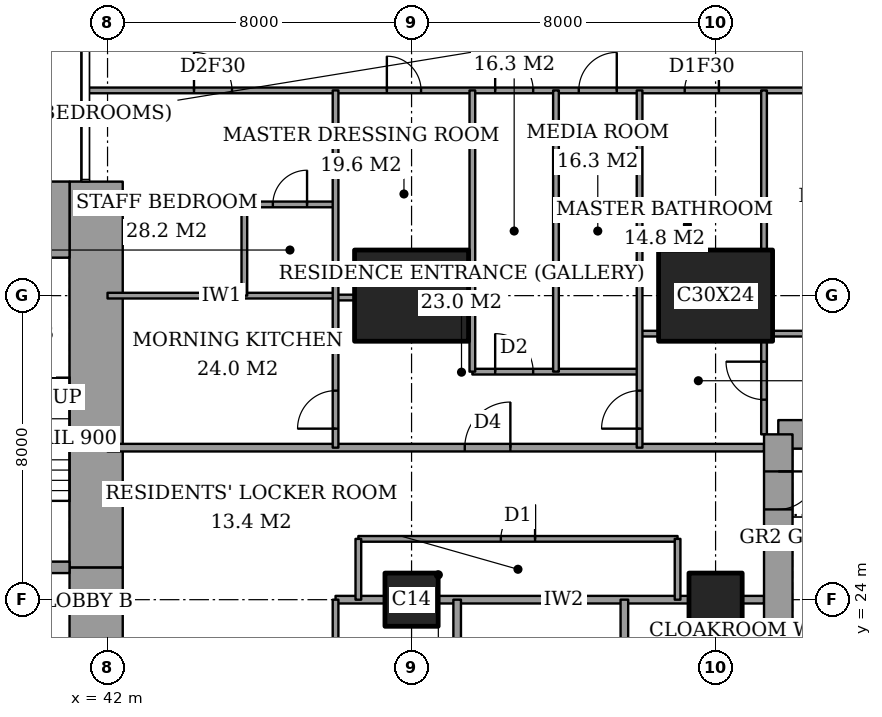
"""IFC4 building model, lengths in metres.
Left out: names, types, materials, properties, quantities, classifications, styles, units other than length and angle.
Written with IfcOpenShell. Run it as: python <this file> out.ifc"""

import sys

from ifc_helpers import new_model, si_unit, direction, frame, frame_2d, origin, origin_2d, place, context, subcontext, project, spatial, rectangle, extrude, element, fill, save


model = new_model("IFC4")
c1 = context("Model", 3, precision=1e-05, world=origin(), true_north=direction((0.0, 1.0)))
c2 = subcontext(c1, "Body", "Model", "MODEL_VIEW")
j1 = project(units=[si_unit("LENGTHUNIT", "METRE"), si_unit("PLANEANGLEUNIT", "RADIAN")], contexts=[c1])
p1 = place(None, origin())
s1 = spatial("IfcSite", under=j1, at=p1, CompositionType="ELEMENT")
p2 = place(p1, origin())
s2 = spatial("IfcBuilding", under=s1, at=p2, CompositionType="ELEMENT")
p3 = place(p2, frame((0.0, 0.0, 287.1)))
s3 = spatial("IfcBuildingStorey", under=s2, at=p3, CompositionType="ELEMENT", Elevation=287.1)
p4 = place(p3, frame((50.0, 24.0, 0.0), z_axis=(0.0, 0.0, 1.0), x_axis=(1.0, 0.0, 0.0)))
e1 = element("IfcColumn", 1, at=p4, inside=s3, PredefinedType="COLUMN", context=c2, shape_type="SweptSolid", body=[
    extrude(rectangle(XDim=1.4, YDim=1.4, at=origin_2d()), origin(), (0.0, 0.0, 1.0), 4.5),
])
p5 = place(p3, frame((50.0, 32.0, 0.0), z_axis=(0.0, 0.0, 1.0), x_axis=(1.0, 0.0, 0.0)))
e2 = element("IfcColumn", 2, at=p5, inside=s3, PredefinedType="COLUMN", context=c2, shape_type="SweptSolid", body=[
    extrude(rectangle(XDim=3.0, YDim=2.4, at=origin_2d()), origin(), (0.0, 0.0, 1.0), 4.5),
])
p6 = place(p3, frame((58.0, 24.0, 0.0), z_axis=(0.0, 0.0, 1.0), x_axis=(1.0, 0.0, 0.0)))
e3 = element("IfcColumn", 3, at=p6, inside=s3, PredefinedType="COLUMN", context=c2, shape_type="SweptSolid", body=[
    extrude(rectangle(XDim=1.4, YDim=1.4, at=origin_2d()), origin(), (0.0, 0.0, 1.0), 4.5),
])
p7 = place(p3, frame((58.0, 32.0, 0.0), z_axis=(0.0, 0.0, 1.0), x_axis=(1.0, 0.0, 0.0)))
e4 = element("IfcColumn", 4, at=p7, inside=s3, PredefinedType="COLUMN", context=c2, shape_type="SweptSolid", body=[
    extrude(rectangle(XDim=3.0, YDim=2.4, at=origin_2d()), origin(), (0.0, 0.0, 1.0), 4.5),
])
p8 = place(p3, frame((37.85, 34.0, 0.0), z_axis=(0.0, 0.0, 1.0), x_axis=(1.0, 0.0, 0.0)))
e5 = element("IfcWall", 5, at=p8, inside=s3, PredefinedType="SHEAR", context=c2, shape_type="SweptSolid", body=[
    extrude(rectangle(XDim=3.15, YDim=2.0, at=frame_2d((1.575, 0.0))), origin(), (0.0, 0.0, 1.0), 4.5),
])
p9 = place(p3, frame((41.7, 13.0, 0.0), z_axis=(0.0, 0.0, 1.0), x_axis=(0.0, 1.0, 0.0)))
e6 = element("IfcWall", 6, at=p9, inside=s3, PredefinedType="SHEAR", context=c2, shape_type="SweptSolid", body=[
    extrude(rectangle(XDim=11.85, YDim=1.4, at=frame_2d((5.925, 0.0))), origin(), (0.0, 0.0, 1.0), 4.5),
])
p10 = place(p9, frame((7.5, 0.0, 0.0)))
e7 = element("IfcOpeningElement", 7, at=p10, cuts=e6, PredefinedType="OPENING", context=c2, shape_type="SweptSolid", body=[
    extrude(rectangle(XDim=1.8, YDim=2.4, at=frame_2d((0.9, 1.2))), frame((0.0, 0.71, 0.0), z_axis=(0.0, -1.0, 0.0), x_axis=(1.0, 0.0, 0.0)), (0.0, 0.0, 1.0), 1.42),
])
p11 = place(p3, frame((41.7, 24.85, 0.0), z_axis=(0.0, 0.0, 1.0), x_axis=(0.0, 1.0, 0.0)))
e8 = element("IfcWall", 8, at=p11, inside=s3, PredefinedType="SHEAR", context=c2, shape_type="SweptSolid", body=[
    extrude(rectangle(XDim=10.15, YDim=1.4, at=frame_2d((5.075, 0.0))), origin(), (0.0, 0.0, 1.0), 4.5),
])
p12 = place(p3, frame((37.85, 24.85, 0.0), z_axis=(0.0, 0.0, 1.0), x_axis=(1.0, 0.0, 0.0)))
e9 = element("IfcWall", 9, at=p12, inside=s3, PredefinedType="SHEAR", context=c2, shape_type="SweptSolid", body=[
    extrude(rectangle(XDim=3.15, YDim=0.3, at=frame_2d((1.575, 0.0))), origin(), (0.0, 0.0, 1.0), 4.5),
])
p13 = place(p12, frame((0.95, 0.0, 0.0)))
e10 = element("IfcOpeningElement", 10, at=p13, cuts=e9, PredefinedType="OPENING", context=c2, shape_type="SweptSolid", body=[
    extrude(rectangle(XDim=1.0, YDim=2.1, at=frame_2d((0.5, 1.05))), frame((0.0, 0.16, 0.0), z_axis=(0.0, -1.0, 0.0), x_axis=(1.0, 0.0, 0.0)), (0.0, 0.0, 1.0), 0.32),
])
p14 = place(p3, frame((64.1, 28.35, 0.0), z_axis=(0.0, 0.0, 1.0), x_axis=(-1.0, 0.0, 0.0)))
e11 = element("IfcWall", 11, at=p14, inside=s3, PredefinedType="SHEAR", context=c2, shape_type="SweptSolid", body=[
    extrude(rectangle(XDim=4.45, YDim=0.75, at=frame_2d((2.225, 0.0))), origin(), (0.0, 0.0, 1.0), 4.5),
])
p15 = place(p3, frame((59.65, 28.35, 0.0), z_axis=(0.0, 0.0, 1.0), x_axis=(0.0, -1.0, 0.0)))
e12 = element("IfcWall", 12, at=p15, inside=s3, PredefinedType="SHEAR", context=c2, shape_type="SweptSolid", body=[
    extrude(rectangle(XDim=8.7, YDim=0.75, at=frame_2d((4.35, 0.0))), origin(), (0.0, 0.0, 1.0), 4.5),
])
p16 = place(p15, frame((0.975, 0.0, 0.0)))
e13 = element("IfcOpeningElement", 13, at=p16, cuts=e12, PredefinedType="OPENING", context=c2, shape_type="SweptSolid", body=[
    extrude(rectangle(XDim=1.0, YDim=2.1, at=frame_2d((0.5, 1.05))), frame((0.0, 0.385, 0.0), z_axis=(0.0, -1.0, 0.0), x_axis=(1.0, 0.0, 0.0)), (0.0, 0.0, 1.0), 0.77),
])
p17 = place(p3, frame((48.0, 24.0, 0.0), z_axis=(0.0, 0.0, 1.0), x_axis=(1.0, 0.0, 0.0)))
e14 = element("IfcWall", 14, at=p17, inside=s3, PredefinedType="PARTITIONING", context=c2, shape_type="SweptSolid", body=[
    extrude(rectangle(XDim=1.3, YDim=0.2, at=frame_2d((0.65, 0.0))), origin(), (0.0, 0.0, 1.0), 4.2),
])
p18 = place(p3, frame((50.7, 24.0, 0.0), z_axis=(0.0, 0.0, 1.0), x_axis=(1.0, 0.0, 0.0)))
e15 = element("IfcWall", 15, at=p18, inside=s3, PredefinedType="PARTITIONING", context=c2, shape_type="SweptSolid", body=[
    extrude(rectangle(XDim=6.6, YDim=0.2, at=frame_2d((3.3, 0.0))), origin(), (0.0, 0.0, 1.0), 4.2),
])
p19 = place(p3, frame((58.7, 24.0, 0.0), z_axis=(0.0, 0.0, 1.0), x_axis=(1.0, 0.0, 0.0)))
e16 = element("IfcWall", 16, at=p19, inside=s3, PredefinedType="PARTITIONING", context=c2, shape_type="SweptSolid", body=[
    extrude(rectangle(XDim=0.575, YDim=0.2, at=frame_2d((0.288, 0.0))), origin(), (0.0, 0.0, 1.0), 4.2),
])
p20 = place(p3, frame((48.6, 25.6, 0.0), z_axis=(0.0, 0.0, 1.0), x_axis=(1.0, 0.0, 0.0)))
e17 = element("IfcWall", 17, at=p20, inside=s3, PredefinedType="PARTITIONING", context=c2, shape_type="SweptSolid", body=[
    extrude(rectangle(XDim=8.4, YDim=0.15, at=frame_2d((4.2, 0.0))), origin(), (0.0, 0.0, 1.0), 4.2),
])
p21 = place(p20, frame((3.75, 0.0, 0.0)))
e18 = element("IfcOpeningElement", 18, at=p21, cuts=e17, PredefinedType="OPENING", context=c2, shape_type="SweptSolid", body=[
    extrude(rectangle(XDim=0.9, YDim=2.1, at=frame_2d((0.45, 1.05))), frame((0.0, 0.085, 0.0), z_axis=(0.0, -1.0, 0.0), x_axis=(1.0, 0.0, 0.0)), (0.0, 0.0, 1.0), 0.17),
])
p22 = place(p3, frame((42.0, 28.0, 0.0), z_axis=(0.0, 0.0, 1.0), x_axis=(1.0, 0.0, 0.0)))
e19 = element("IfcWall", 19, at=p22, inside=s3, PredefinedType="PARTITIONING", context=c2, shape_type="SweptSolid", body=[
    extrude(rectangle(XDim=17.275, YDim=0.2, at=frame_2d((8.637, 0.0))), origin(), (0.0, 0.0, 1.0), 4.2),
])
p23 = place(p22, frame((9.4, 0.0, 0.0)))
e20 = element("IfcOpeningElement", 20, at=p23, cuts=e19, PredefinedType="OPENING", context=c2, shape_type="SweptSolid", body=[
    extrude(rectangle(XDim=1.2, YDim=2.4, at=frame_2d((0.6, 1.2))), frame((0.0, 0.11, 0.0), z_axis=(0.0, -1.0, 0.0), x_axis=(1.0, 0.0, 0.0)), (0.0, 0.0, 1.0), 0.22),
])
p24 = place(p3, frame((51.6, 30.0, 0.0), z_axis=(0.0, 0.0, 1.0), x_axis=(1.0, 0.0, 0.0)))
e21 = element("IfcWall", 21, at=p24, inside=s3, PredefinedType="PARTITIONING", context=c2, shape_type="SweptSolid", body=[
    extrude(rectangle(XDim=4.4, YDim=0.15, at=frame_2d((2.2, 0.0))), origin(), (0.0, 0.0, 1.0), 4.2),
])
p25 = place(p24, frame((0.6, 0.0, 0.0)))
e22 = element("IfcOpeningElement", 22, at=p25, cuts=e21, PredefinedType="OPENING", context=c2, shape_type="SweptSolid", body=[
    extrude(rectangle(XDim=1.0, YDim=2.1, at=frame_2d((0.5, 1.05))), frame((0.0, 0.085, 0.0), z_axis=(0.0, -1.0, 0.0), x_axis=(1.0, 0.0, 0.0)), (0.0, 0.0, 1.0), 0.17),
])
p26 = place(p3, frame((56.0, 31.0, 0.0), z_axis=(0.0, 0.0, 1.0), x_axis=(1.0, 0.0, 0.0)))
e23 = element("IfcWall", 23, at=p26, inside=s3, PredefinedType="PARTITIONING", context=c2, shape_type="SweptSolid", body=[
    extrude(rectangle(XDim=0.5, YDim=0.15, at=frame_2d((0.25, 0.0))), origin(), (0.0, 0.0, 1.0), 4.2),
])
p27 = place(p3, frame((59.5, 31.0, 0.0), z_axis=(0.0, 0.0, 1.0), x_axis=(1.0, 0.0, 0.0)))
e24 = element("IfcWall", 24, at=p27, inside=s3, PredefinedType="PARTITIONING", context=c2, shape_type="SweptSolid", body=[
    extrude(rectangle(XDim=6.95, YDim=0.15, at=frame_2d((3.475, 0.0))), origin(), (0.0, 0.0, 1.0), 4.2),
])
p28 = place(p3, frame((48.0, 31.95, 0.0), z_axis=(0.0, 0.0, 1.0), x_axis=(1.0, 0.0, 0.0)))
e25 = element("IfcWall", 25, at=p28, inside=s3, PredefinedType="PARTITIONING", context=c2, shape_type="SweptSolid", body=[
    extrude(rectangle(XDim=0.5, YDim=0.15, at=frame_2d((0.25, 0.0))), origin(), (0.0, 0.0, 1.0), 4.2),
])
p29 = place(p3, frame((42.0, 32.0, 0.0), z_axis=(0.0, 0.0, 1.0), x_axis=(1.0, 0.0, 0.0)))
e26 = element("IfcWall", 26, at=p29, inside=s3, PredefinedType="PARTITIONING", context=c2, shape_type="SweptSolid", body=[
    extrude(rectangle(XDim=6.0, YDim=0.15, at=frame_2d((3.0, 0.0))), origin(), (0.0, 0.0, 1.0), 4.2),
])
p30 = place(p3, frame((45.6, 34.4, 0.0), z_axis=(0.0, 0.0, 1.0), x_axis=(1.0, 0.0, 0.0)))
e27 = element("IfcWall", 27, at=p30, inside=s3, PredefinedType="PARTITIONING", context=c2, shape_type="SweptSolid", body=[
    extrude(rectangle(XDim=2.4, YDim=0.15, at=frame_2d((1.2, 0.0))), origin(), (0.0, 0.0, 1.0), 4.2),
])
p31 = place(p30, frame((0.75, 0.0, 0.0)))
e28 = element("IfcOpeningElement", 28, at=p31, cuts=e27, PredefinedType="OPENING", context=c2, shape_type="SweptSolid", body=[
    extrude(rectangle(XDim=0.9, YDim=2.1, at=frame_2d((0.45, 1.05))), frame((0.0, 0.085, 0.0), z_axis=(0.0, -1.0, 0.0), x_axis=(1.0, 0.0, 0.0)), (0.0, 0.0, 1.0), 0.17),
])
p32 = place(p3, frame((41.439, 37.4, 0.0), z_axis=(0.0, 0.0, 1.0), x_axis=(1.0, 0.0, 0.0)))
e29 = element("IfcWall", 29, at=p32, inside=s3, PredefinedType="PARTITIONING", context=c2, shape_type="SweptSolid", body=[
    extrude(rectangle(XDim=25.011, YDim=0.15, at=frame_2d((12.505, 0.0))), origin(), (0.0, 0.0, 1.0), 4.2),
])
p33 = place(p32, frame((10.761, 0.0, 0.0)))
e30 = element("IfcOpeningElement", 30, at=p33, cuts=e29, PredefinedType="OPENING", context=c2, shape_type="SweptSolid", body=[
    extrude(rectangle(XDim=1.0, YDim=2.1, at=frame_2d((0.5, 1.05))), frame((0.0, 0.085, 0.0), z_axis=(0.0, -1.0, 0.0), x_axis=(1.0, 0.0, 0.0)), (0.0, 0.0, 1.0), 0.17),
])
p34 = place(p32, frame((20.924, 0.0, 0.0)))
e31 = element("IfcOpeningElement", 31, at=p34, cuts=e29, PredefinedType="OPENING", context=c2, shape_type="SweptSolid", body=[
    extrude(rectangle(XDim=1.0, YDim=2.1, at=frame_2d((0.5, 1.05))), frame((0.0, 0.085, 0.0), z_axis=(0.0, -1.0, 0.0), x_axis=(1.0, 0.0, 0.0)), (0.0, 0.0, 1.0), 0.17),
])
p35 = place(p32, frame((15.749, 0.0, 0.0)))
e32 = element("IfcOpeningElement", 32, at=p35, cuts=e29, PredefinedType="OPENING", context=c2, shape_type="SweptSolid", body=[
    extrude(rectangle(XDim=0.9, YDim=2.1, at=frame_2d((0.45, 1.05))), frame((0.0, 0.085, 0.0), z_axis=(0.0, -1.0, 0.0), x_axis=(1.0, 0.0, 0.0)), (0.0, 0.0, 1.0), 0.17),
])
p36 = place(p32, frame((12.961, 0.0, 0.0)))
e33 = element("IfcOpeningElement", 33, at=p36, cuts=e29, PredefinedType="OPENING", context=c2, shape_type="SweptSolid", body=[
    extrude(rectangle(XDim=1.0, YDim=2.1, at=frame_2d((0.5, 1.05))), frame((0.0, 0.085, 0.0), z_axis=(0.0, -1.0, 0.0), x_axis=(1.0, 0.0, 0.0)), (0.0, 0.0, 1.0), 0.17),
])
p37 = place(p32, frame((7.911, 0.0, 0.0)))
e34 = element("IfcOpeningElement", 34, at=p37, cuts=e29, PredefinedType="OPENING", context=c2, shape_type="SweptSolid", body=[
    extrude(rectangle(XDim=0.9, YDim=2.1, at=frame_2d((0.45, 1.05))), frame((0.0, 0.085, 0.0), z_axis=(0.0, -1.0, 0.0), x_axis=(1.0, 0.0, 0.0)), (0.0, 0.0, 1.0), 0.17),
])
p38 = place(p32, frame((2.836, 0.0, 0.0)))
e35 = element("IfcOpeningElement", 35, at=p38, cuts=e29, PredefinedType="OPENING", context=c2, shape_type="SweptSolid", body=[
    extrude(rectangle(XDim=1.0, YDim=2.1, at=frame_2d((0.5, 1.05))), frame((0.0, 0.085, 0.0), z_axis=(0.0, -1.0, 0.0), x_axis=(1.0, 0.0, 0.0)), (0.0, 0.0, 1.0), 0.17),
])
p39 = place(p3, frame((45.6, 32.0, 0.0), z_axis=(0.0, 0.0, 1.0), x_axis=(0.0, 1.0, 0.0)))
e36 = element("IfcWall", 36, at=p39, inside=s3, PredefinedType="PARTITIONING", context=c2, shape_type="SweptSolid", body=[
    extrude(rectangle(XDim=2.4, YDim=0.15, at=frame_2d((1.2, 0.0))), origin(), (0.0, 0.0, 1.0), 4.2),
])
p40 = place(p3, frame((48.0, 10.6, 0.0), z_axis=(0.0, 0.0, 1.0), x_axis=(0.0, 1.0, 0.0)))
e37 = element("IfcWall", 37, at=p40, inside=s3, PredefinedType="PARTITIONING", context=c2, shape_type="SweptSolid", body=[
    extrude(rectangle(XDim=13.4, YDim=0.15, at=frame_2d((6.7, 0.0))), origin(), (0.0, 0.0, 1.0), 4.2),
])
p41 = place(p40, frame((10.8, 0.0, 0.0)))
e38 = element("IfcOpeningElement", 38, at=p41, cuts=e37, PredefinedType="OPENING", context=c2, shape_type="SweptSolid", body=[
    extrude(rectangle(XDim=1.2, YDim=2.4, at=frame_2d((0.6, 1.2))), frame((0.0, 0.085, 0.0), z_axis=(0.0, -1.0, 0.0), x_axis=(1.0, 0.0, 0.0)), (0.0, 0.0, 1.0), 0.17),
])
p42 = place(p40, frame((7.45, 0.0, 0.0)))
e39 = element("IfcOpeningElement", 39, at=p42, cuts=e37, PredefinedType="OPENING", context=c2, shape_type="SweptSolid", body=[
    extrude(rectangle(XDim=0.9, YDim=2.1, at=frame_2d((0.45, 1.05))), frame((0.0, 0.085, 0.0), z_axis=(0.0, -1.0, 0.0), x_axis=(1.0, 0.0, 0.0)), (0.0, 0.0, 1.0), 0.17),
])
p43 = place(p3, frame((48.0, 28.0, 0.0), z_axis=(0.0, 0.0, 1.0), x_axis=(0.0, 1.0, 0.0)))
e40 = element("IfcWall", 40, at=p43, inside=s3, PredefinedType="PARTITIONING", context=c2, shape_type="SweptSolid", body=[
    extrude(rectangle(XDim=9.4, YDim=0.15, at=frame_2d((4.7, 0.0))), origin(), (0.0, 0.0, 1.0), 4.2),
])
p44 = place(p43, frame((0.5, 0.0, 0.0)))
e41 = element("IfcOpeningElement", 41, at=p44, cuts=e40, PredefinedType="OPENING", context=c2, shape_type="SweptSolid", body=[
    extrude(rectangle(XDim=1.0, YDim=2.1, at=frame_2d((0.5, 1.05))), frame((0.0, 0.085, 0.0), z_axis=(0.0, -1.0, 0.0), x_axis=(1.0, 0.0, 0.0)), (0.0, 0.0, 1.0), 0.17),
])
p45 = place(p3, frame((48.6, 24.0, 0.0), z_axis=(0.0, 0.0, 1.0), x_axis=(0.0, 1.0, 0.0)))
e42 = element("IfcWall", 42, at=p45, inside=s3, PredefinedType="PARTITIONING", context=c2, shape_type="SweptSolid", body=[
    extrude(rectangle(XDim=1.6, YDim=0.15, at=frame_2d((0.8, 0.0))), origin(), (0.0, 0.0, 1.0), 4.2),
])
p46 = place(p3, frame((51.2, 21.6, 0.0), z_axis=(0.0, 0.0, 1.0), x_axis=(0.0, 1.0, 0.0)))
e43 = element("IfcWall", 43, at=p46, inside=s3, PredefinedType="PARTITIONING", context=c2, shape_type="SweptSolid", body=[
    extrude(rectangle(XDim=2.4, YDim=0.2, at=frame_2d((1.2, 0.0))), origin(), (0.0, 0.0, 1.0), 4.2),
])
for number, where, z_axis, x_axis in (
    (44, (51.6, 30.0, 0.0), (0.0, 0.0, 1.0), (0.0, 1.0, 0.0)),
    (45, (53.8, 30.0, 0.0), (0.0, 0.0, 1.0), (0.0, 1.0, 0.0)),
):
    element("IfcWall", number, at=place(p3, frame(where, z_axis=z_axis, x_axis=x_axis)), inside=s3, PredefinedType="PARTITIONING", context=c2, shape_type="SweptSolid", body=[
        extrude(rectangle(XDim=7.4, YDim=0.15, at=frame_2d((3.7, 0.0))), origin(), (0.0, 0.0, 1.0), 4.2),
    ])
p47 = place(p3, frame((55.6, 21.6, 0.0), z_axis=(0.0, 0.0, 1.0), x_axis=(0.0, 1.0, 0.0)))
e46 = element("IfcWall", 46, at=p47, inside=s3, PredefinedType="PARTITIONING", context=c2, shape_type="SweptSolid", body=[
    extrude(rectangle(XDim=2.4, YDim=0.2, at=frame_2d((1.2, 0.0))), origin(), (0.0, 0.0, 1.0), 4.2),
])
p48 = place(p3, frame((56.0, 28.0, 0.0), z_axis=(0.0, 0.0, 1.0), x_axis=(0.0, 1.0, 0.0)))
e47 = element("IfcWall", 47, at=p48, inside=s3, PredefinedType="PARTITIONING", context=c2, shape_type="SweptSolid", body=[
    extrude(rectangle(XDim=9.4, YDim=0.15, at=frame_2d((4.7, 0.0))), origin(), (0.0, 0.0, 1.0), 4.2),
])
p49 = place(p48, frame((0.5, 0.0, 0.0)))
e48 = element("IfcOpeningElement", 48, at=p49, cuts=e47, PredefinedType="OPENING", context=c2, shape_type="SweptSolid", body=[
    extrude(rectangle(XDim=1.0, YDim=2.1, at=frame_2d((0.5, 1.05))), frame((0.0, 0.085, 0.0), z_axis=(0.0, -1.0, 0.0), x_axis=(1.0, 0.0, 0.0)), (0.0, 0.0, 1.0), 0.17),
])
p50 = place(p3, frame((57.0, 24.0, 0.0), z_axis=(0.0, 0.0, 1.0), x_axis=(0.0, 1.0, 0.0)))
e49 = element("IfcWall", 49, at=p50, inside=s3, PredefinedType="PARTITIONING", context=c2, shape_type="SweptSolid", body=[
    extrude(rectangle(XDim=1.6, YDim=0.15, at=frame_2d((0.8, 0.0))), origin(), (0.0, 0.0, 1.0), 4.2),
])
p51 = place(p3, frame((59.275, 28.35, 0.0), z_axis=(0.0, 0.0, 1.0), x_axis=(0.0, 1.0, 0.0)))
e50 = element("IfcWall", 50, at=p51, inside=s3, PredefinedType="PARTITIONING", context=c2, shape_type="SweptSolid", body=[
    extrude(rectangle(XDim=2.45, YDim=0.15, at=frame_2d((1.225, 0.0))), origin(), (0.0, 0.0, 1.0), 4.2),
])
p52 = place(p51, frame((0.913, 0.0, 0.0)))
e51 = element("IfcOpeningElement", 51, at=p52, cuts=e50, PredefinedType="OPENING", context=c2, shape_type="SweptSolid", body=[
    extrude(rectangle(XDim=1.0, YDim=2.1, at=frame_2d((0.5, 1.05))), frame((0.0, 0.085, 0.0), z_axis=(0.0, -1.0, 0.0), x_axis=(1.0, 0.0, 0.0)), (0.0, 0.0, 1.0), 0.17),
])
p53 = place(p3, frame((59.275, 33.2, 0.0), z_axis=(0.0, 0.0, 1.0), x_axis=(0.0, 1.0, 0.0)))
e52 = element("IfcWall", 52, at=p53, inside=s3, PredefinedType="PARTITIONING", context=c2, shape_type="SweptSolid", body=[
    extrude(rectangle(XDim=4.2, YDim=0.15, at=frame_2d((2.1, 0.0))), origin(), (0.0, 0.0, 1.0), 4.2),
])
p54 = place(p33, origin())
e53 = element("IfcDoor", 53, at=p54, inside=s3, OperationType="SINGLE_SWING_RIGHT", PredefinedType="DOOR", context=c2, shape_type="SweptSolid", body=[
    extrude(rectangle(XDim=1.0, YDim=2.1, at=frame_2d((0.5, 1.05))), frame((0.0, 0.025, 0.0), z_axis=(0.0, -1.0, 0.0), x_axis=(1.0, 0.0, 0.0)), (0.0, 0.0, 1.0), 0.05),
])
fill(e30, e53)
p55 = place(p52, origin())
e54 = element("IfcDoor", 54, at=p55, inside=s3, OperationType="SINGLE_SWING_LEFT", PredefinedType="DOOR", context=c2, shape_type="SweptSolid", body=[
    extrude(rectangle(XDim=1.0, YDim=2.1, at=frame_2d((0.5, 1.05))), frame((0.0, 0.025, 0.0), z_axis=(0.0, -1.0, 0.0), x_axis=(1.0, 0.0, 0.0)), (0.0, 0.0, 1.0), 0.05),
])
fill(e51, e54)
p56 = place(p35, origin())
e55 = element("IfcDoor", 55, at=p56, inside=s3, OperationType="SINGLE_SWING_LEFT", PredefinedType="DOOR", context=c2, shape_type="SweptSolid", body=[
    extrude(rectangle(XDim=0.9, YDim=2.1, at=frame_2d((0.45, 1.05))), frame((0.0, 0.025, 0.0), z_axis=(0.0, -1.0, 0.0), x_axis=(1.0, 0.0, 0.0)), (0.0, 0.0, 1.0), 0.05),
])
fill(e32, e55)
p57 = place(p49, origin())
e56 = element("IfcDoor", 56, at=p57, inside=s3, OperationType="SINGLE_SWING_RIGHT", PredefinedType="DOOR", context=c2, shape_type="SweptSolid", body=[
    extrude(rectangle(XDim=1.0, YDim=2.1, at=frame_2d((0.5, 1.05))), frame((0.0, 0.025, 0.0), z_axis=(0.0, -1.0, 0.0), x_axis=(1.0, 0.0, 0.0)), (0.0, 0.0, 1.0), 0.05),
])
fill(e48, e56)
p58 = place(p23, origin())
e57 = element("IfcDoor", 57, at=p58, inside=s3, OperationType="SINGLE_SWING_LEFT", PredefinedType="DOOR", context=c2, shape_type="SweptSolid", body=[
    extrude(rectangle(XDim=1.2, YDim=2.4, at=frame_2d((0.6, 1.2))), frame((0.0, 0.025, 0.0), z_axis=(0.0, -1.0, 0.0), x_axis=(1.0, 0.0, 0.0)), (0.0, 0.0, 1.0), 0.05),
])
fill(e20, e57)
p59 = place(p36, origin())
e58 = element("IfcDoor", 58, at=p59, inside=s3, OperationType="SINGLE_SWING_LEFT", PredefinedType="DOOR", context=c2, shape_type="SweptSolid", body=[
    extrude(rectangle(XDim=1.0, YDim=2.1, at=frame_2d((0.5, 1.05))), frame((0.0, 0.025, 0.0), z_axis=(0.0, -1.0, 0.0), x_axis=(1.0, 0.0, 0.0)), (0.0, 0.0, 1.0), 0.05),
])
fill(e33, e58)
p60 = place(p25, origin())
e59 = element("IfcDoor", 59, at=p60, inside=s3, OperationType="SINGLE_SWING_RIGHT", PredefinedType="DOOR", context=c2, shape_type="SweptSolid", body=[
    extrude(rectangle(XDim=1.0, YDim=2.1, at=frame_2d((0.5, 1.05))), frame((0.0, 0.025, 0.0), z_axis=(0.0, -1.0, 0.0), x_axis=(1.0, 0.0, 0.0)), (0.0, 0.0, 1.0), 0.05),
])
fill(e22, e59)
p61 = place(p37, origin())
e60 = element("IfcDoor", 60, at=p61, inside=s3, OperationType="SINGLE_SWING_RIGHT", PredefinedType="DOOR", context=c2, shape_type="SweptSolid", body=[
    extrude(rectangle(XDim=0.9, YDim=2.1, at=frame_2d((0.45, 1.05))), frame((0.0, 0.025, 0.0), z_axis=(0.0, -1.0, 0.0), x_axis=(1.0, 0.0, 0.0)), (0.0, 0.0, 1.0), 0.05),
])
fill(e34, e60)
p62 = place(p31, origin())
e61 = element("IfcDoor", 61, at=p62, inside=s3, OperationType="SINGLE_SWING_LEFT", PredefinedType="DOOR", context=c2, shape_type="SweptSolid", body=[
    extrude(rectangle(XDim=0.9, YDim=2.1, at=frame_2d((0.45, 1.05))), frame((0.0, 0.025, 0.0), z_axis=(0.0, -1.0, 0.0), x_axis=(1.0, 0.0, 0.0)), (0.0, 0.0, 1.0), 0.05),
])
fill(e28, e61)
p63 = place(p38, origin())
e62 = element("IfcDoor", 62, at=p63, inside=s3, OperationType="SINGLE_SWING_RIGHT", PredefinedType="DOOR", context=c2, shape_type="SweptSolid", body=[
    extrude(rectangle(XDim=1.0, YDim=2.1, at=frame_2d((0.5, 1.05))), frame((0.0, 0.025, 0.0), z_axis=(0.0, -1.0, 0.0), x_axis=(1.0, 0.0, 0.0)), (0.0, 0.0, 1.0), 0.05),
])
fill(e35, e62)
p64 = place(p44, origin())
e63 = element("IfcDoor", 63, at=p64, inside=s3, OperationType="SINGLE_SWING_RIGHT", PredefinedType="DOOR", context=c2, shape_type="SweptSolid", body=[
    extrude(rectangle(XDim=1.0, YDim=2.1, at=frame_2d((0.5, 1.05))), frame((0.0, 0.025, 0.0), z_axis=(0.0, -1.0, 0.0), x_axis=(1.0, 0.0, 0.0)), (0.0, 0.0, 1.0), 0.05),
])
fill(e41, e63)
p65 = place(p21, origin())
e64 = element("IfcDoor", 64, at=p65, inside=s3, OperationType="SINGLE_SWING_LEFT", PredefinedType="DOOR", context=c2, shape_type="SweptSolid", body=[
    extrude(rectangle(XDim=0.9, YDim=2.1, at=frame_2d((0.45, 1.05))), frame((0.0, 0.025, 0.0), z_axis=(0.0, -1.0, 0.0), x_axis=(1.0, 0.0, 0.0)), (0.0, 0.0, 1.0), 0.05),
])
fill(e18, e64)
p66 = place(p16, origin())
e65 = element("IfcDoor", 65, at=p66, inside=s3, OperationType="SINGLE_SWING_RIGHT", PredefinedType="DOOR", context=c2, shape_type="SweptSolid", body=[
    extrude(rectangle(XDim=1.0, YDim=2.1, at=frame_2d((0.5, 1.05))), frame((0.0, 0.025, 0.0), z_axis=(0.0, -1.0, 0.0), x_axis=(1.0, 0.0, 0.0)), (0.0, 0.0, 1.0), 0.05),
])
fill(e13, e65)
save(model, sys.argv[1])
